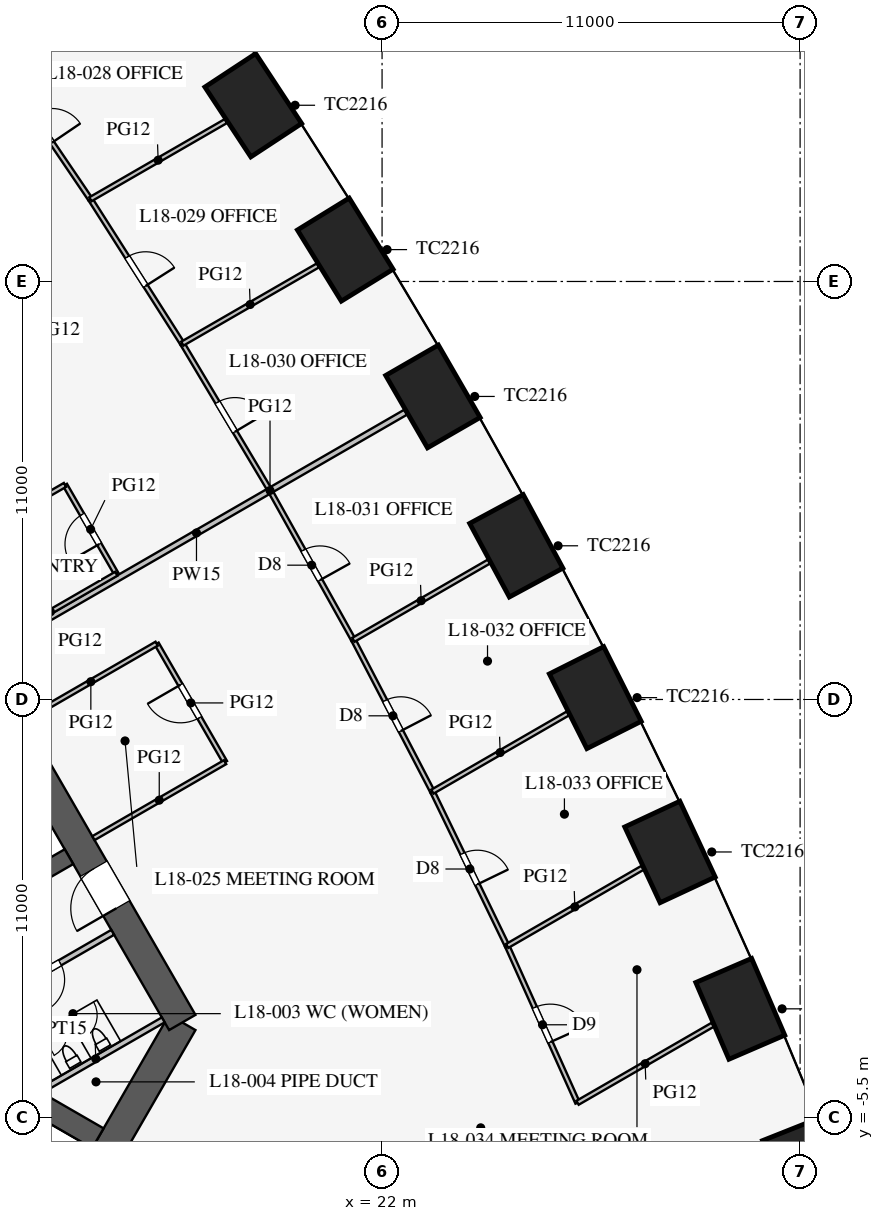
"""IFC4 building model, lengths in metres.
Left out: names, types, materials, properties, quantities, classifications, styles, units other than length and angle.
Written with IfcOpenShell. Run it as: python <this file> out.ifc"""

import sys

from ifc_helpers import new_model, si_unit, direction, frame, frame_2d, origin, origin_2d, place, context, subcontext, project, spatial, rectangle, extrude, element, fill, save


model = new_model("IFC4")
c1 = context("Model", 3, precision=1e-05, world=origin(), true_north=direction((0.0, 1.0)))
c2 = subcontext(c1, "Body", "Model", "MODEL_VIEW")
j1 = project(units=[si_unit("LENGTHUNIT", "METRE"), si_unit("PLANEANGLEUNIT", "RADIAN")], contexts=[c1])
p1 = place(None, origin())
s1 = spatial("IfcSite", under=j1, at=p1, CompositionType="ELEMENT")
p2 = place(p1, origin())
s2 = spatial("IfcBuilding", under=s1, at=p2, CompositionType="ELEMENT")
p3 = place(p2, frame((0.0, 0.0, 79.5)))
s3 = spatial("IfcBuildingStorey", under=s2, at=p3, CompositionType="ELEMENT", Elevation=79.5)
for number, where, z_axis, x_axis in (
    (1, (33.16, -6.836, 0.0), (0.0, 0.0, 1.0), (-0.369, 0.929, 0.0)),
    (2, (31.426, -2.641, 0.0), (0.0, 0.0, 1.0), (-0.396, 0.918, 0.0)),
    (3, (29.576, 1.487, 0.0), (0.0, 0.0, 1.0), (-0.423, 0.906, 0.0)),
    (4, (27.611, 5.549, 0.0), (0.0, 0.0, 1.0), (-0.449, 0.894, 0.0)),
    (5, (25.531, 9.544, 0.0), (0.0, 0.0, 1.0), (-0.475, 0.88, 0.0)),
    (6, (23.338, 13.474, 0.0), (0.0, 0.0, 1.0), (-0.5, 0.866, 0.0)),
    (7, (21.031, 17.339, 0.0), (0.0, 0.0, 1.0), (-0.525, 0.851, 0.0)),
    (8, (18.611, 21.137, 0.0), (0.0, 0.0, 1.0), (-0.549, 0.836, 0.0)),
):
    element("IfcColumn", number, at=place(p3, frame(where, z_axis=z_axis, x_axis=x_axis)), inside=s3, PredefinedType="COLUMN", context=c2, shape_type="SweptSolid", body=[
        extrude(rectangle(XDim=2.2, YDim=1.6, at=origin_2d()), origin(), (0.0, 0.0, 1.0), 4.2),
    ])
p4 = place(p3, frame((10.97, -13.0, 0.0), z_axis=(0.0, 0.0, 1.0), x_axis=(0.499995765644, 0.866027848477, 0.0)))
e9 = element("IfcWall", 9, at=p4, inside=s3, PredefinedType="SHEAR", context=c2, shape_type="SweptSolid", body=[
    extrude(rectangle(XDim=11.547, YDim=0.8, at=frame_2d((5.773, 0.0))), origin(), (0.0, 0.0, 1.0), 4.2),
])
p5 = place(p3, frame((16.743, -3.0, 0.0), z_axis=(0.0, 0.0, 1.0), x_axis=(-0.500002442456, 0.866023993627, 0.0)))
e10 = element("IfcWall", 10, at=p5, inside=s3, PredefinedType="SHEAR", context=c2, shape_type="SweptSolid", body=[
    extrude(rectangle(XDim=21.939, YDim=0.8, at=frame_2d((10.97, 0.0))), origin(), (0.0, 0.0, 1.0), 4.2),
])
p6 = place(p5, frame((17.27, 0.0, 0.0)))
e11 = element("IfcOpeningElement", 11, at=p6, cuts=e10, PredefinedType="OPENING", context=c2, shape_type="SweptSolid", body=[
    extrude(rectangle(XDim=1.2, YDim=2.1, at=frame_2d((0.6, 1.05))), frame((0.0, 0.41, 0.0), z_axis=(0.0, -1.0, 0.0), x_axis=(1.0, 0.0, 0.0)), (0.0, 0.0, 1.0), 0.82),
])
p7 = place(p5, frame((3.47, 0.0, 0.0)))
e12 = element("IfcOpeningElement", 12, at=p7, cuts=e10, PredefinedType="OPENING", context=c2, shape_type="SweptSolid", body=[
    extrude(rectangle(XDim=1.2, YDim=2.1, at=frame_2d((0.6, 1.05))), frame((0.0, 0.41, 0.0), z_axis=(0.0, -1.0, 0.0), x_axis=(1.0, 0.0, 0.0)), (0.0, 0.0, 1.0), 0.82),
])
p8 = place(p3, frame((11.532, 0.076, 0.0), z_axis=(0.0, 0.0, 1.0), x_axis=(0.866005588531, 0.500034319456, 0.0)))
e13 = element("IfcWall", 13, at=p8, inside=s3, PredefinedType="SHEAR", context=c2, shape_type="SweptSolid", body=[
    extrude(rectangle(XDim=2.575, YDim=0.45, at=frame_2d((1.288, 0.0))), origin(), (0.0, 0.0, 1.0), 4.2),
])
p9 = place(p3, frame((6.663, -1.509, 0.0), z_axis=(0.0, 0.0, 1.0), x_axis=(0.866019375473, -0.500010441196, 0.0)))
e14 = element("IfcWall", 14, at=p9, inside=s3, PredefinedType="SHEAR", context=c2, shape_type="SweptSolid", body=[
    extrude(rectangle(XDim=9.075, YDim=0.6, at=frame_2d((4.538, 0.0))), origin(), (0.0, 0.0, 1.0), 4.2),
])
p10 = place(p3, frame((10.495, -3.178, 0.0), z_axis=(0.0, 0.0, 1.0), x_axis=(0.86602216432, 0.500005610874, 0.0)))
e15 = element("IfcWall", 15, at=p10, inside=s3, PredefinedType="PARTITIONING", context=c2, shape_type="SweptSolid", body=[
    extrude(rectangle(XDim=5.1, YDim=0.15, at=frame_2d((2.55, 0.0))), origin(), (0.0, 0.0, 1.0), 4.0),
])
p11 = place(p10, frame((2.6, 0.0, 0.0)))
e16 = element("IfcOpeningElement", 16, at=p11, cuts=e15, PredefinedType="OPENING", context=c2, shape_type="SweptSolid", body=[
    extrude(rectangle(XDim=0.9, YDim=2.1, at=frame_2d((0.45, 1.05))), frame((0.0, 0.085, 0.0), z_axis=(0.0, -1.0, 0.0), x_axis=(1.0, 0.0, 0.0)), (0.0, 0.0, 1.0), 0.17),
])
p12 = place(p3, frame((12.691, -4.982, 0.0), z_axis=(0.0, 0.0, 1.0), x_axis=(0.8660249478, 0.500000789788, 0.0)))
e17 = element("IfcWall", 17, at=p12, inside=s3, PredefinedType="PARTITIONING", context=c2, shape_type="SweptSolid", body=[
    extrude(rectangle(XDim=4.1, YDim=0.15, at=frame_2d((2.05, 0.0))), origin(), (0.0, 0.0, 1.0), 4.0),
])
p13 = place(p3, frame((11.613, 6.705, 0.0), z_axis=(0.0, 0.0, 1.0), x_axis=(0.866029791586, 0.499992400027, 0.0)))
e18 = element("IfcWall", 18, at=p13, inside=s3, PredefinedType="PARTITIONING", context=c2, shape_type="SweptSolid", body=[
    extrude(rectangle(XDim=12.709, YDim=0.15, at=frame_2d((6.354, 0.0))), origin(), (0.0, 0.0, 1.0), 2.8),
])
p14 = place(p3, frame((15.006, 8.808, 0.0), z_axis=(0.0, 0.0, 1.0), x_axis=(-0.500048589285, 0.86599734893, 0.0)))
e19 = element("IfcWall", 19, at=p14, inside=s3, PredefinedType="PARTITIONING", context=c2, shape_type="SweptSolid", body=[
    extrude(rectangle(XDim=2.7, YDim=0.12, at=frame_2d((1.35, 0.0))), origin(), (0.0, 0.0, 1.0), 2.9),
])
p15 = place(p14, frame((0.9, 0.0, 0.15)))
e20 = element("IfcOpeningElement", 20, at=p15, cuts=e19, PredefinedType="OPENING", context=c2, shape_type="SweptSolid", body=[
    extrude(rectangle(XDim=0.9, YDim=2.1, at=frame_2d((0.45, 1.05))), frame((0.0, 0.07, 0.0), z_axis=(0.0, -1.0, 0.0), x_axis=(1.0, 0.0, 0.0)), (0.0, 0.0, 1.0), 0.14),
])
p16 = place(p3, frame((17.869, 3.85, 0.0), z_axis=(0.0, 0.0, 1.0), x_axis=(-0.500012057535, 0.866018442252, 0.0)))
e21 = element("IfcWall", 21, at=p16, inside=s3, PredefinedType="PARTITIONING", context=c2, shape_type="SweptSolid", body=[
    extrude(rectangle(XDim=3.6, YDim=0.12, at=frame_2d((1.8, 0.0))), origin(), (0.0, 0.0, 1.0), 2.9),
])
p17 = place(p16, frame((1.35, 0.0, 0.15)))
e22 = element("IfcOpeningElement", 22, at=p17, cuts=e21, PredefinedType="OPENING", context=c2, shape_type="SweptSolid", body=[
    extrude(rectangle(XDim=1.0, YDim=2.1, at=frame_2d((0.5, 1.05))), frame((0.0, 0.07, 0.0), z_axis=(0.0, -1.0, 0.0), x_axis=(1.0, 0.0, 0.0)), (0.0, 0.0, 1.0), 0.14),
])
p18 = place(p3, frame((11.542, 6.808, 0.0), z_axis=(0.0, 0.0, 1.0), x_axis=(0.866026010844, 0.49999894854, 0.0)))
e23 = element("IfcWall", 23, at=p18, inside=s3, PredefinedType="PARTITIONING", context=c2, shape_type="SweptSolid", body=[
    extrude(rectangle(XDim=4.0, YDim=0.12, at=frame_2d((2.0, 0.0))), origin(), (0.0, 0.0, 1.0), 2.8),
])
for number, where, z_axis, x_axis in (
    (24, (10.192, 9.146, 0.0), (0.0, 0.0, 1.0), (0.866, 0.5, 0.0)),
    (25, (12.605, 4.968, 0.0), (0.0, 0.0, 1.0), (0.866, 0.5, 0.0)),
    (26, (14.405, 1.85, 0.0), (0.0, 0.0, 1.0), (0.866, 0.5, 0.0)),
):
    element("IfcWall", number, at=place(p3, frame(where, z_axis=z_axis, x_axis=x_axis)), inside=s3, PredefinedType="PARTITIONING", context=c2, shape_type="SweptSolid", body=[
        extrude(rectangle(XDim=4.0, YDim=0.12, at=frame_2d((2.0, 0.0))), origin(), (0.0, 0.0, 1.0), 2.9),
    ])
p19 = place(p3, frame((19.052, 10.999, 0.0), z_axis=(0.0, 0.0, 1.0), x_axis=(-0.51252396108, 0.858672923364, 0.0)))
e27 = element("IfcWall", 27, at=p19, inside=s3, PredefinedType="PARTITIONING", context=c2, shape_type="SweptSolid", body=[
    extrude(rectangle(XDim=4.5, YDim=0.12, at=frame_2d((2.25, 0.0))), origin(), (0.0, 0.0, 1.0), 2.9),
])
p20 = place(p19, frame((1.8, 0.0, 0.15)))
e28 = element("IfcOpeningElement", 28, at=p20, cuts=e27, PredefinedType="OPENING", context=c2, shape_type="SweptSolid", body=[
    extrude(rectangle(XDim=0.9, YDim=2.1, at=frame_2d((0.45, 1.05))), frame((0.0, 0.07, 0.0), z_axis=(0.0, -1.0, 0.0), x_axis=(1.0, 0.0, 0.0)), (0.0, 0.0, 1.0), 0.14),
])
p21 = place(p3, frame((16.745, 14.864, 0.0), z_axis=(0.0, 0.0, 1.0), x_axis=(-0.537205132487, 0.843451626135, 0.0)))
e29 = element("IfcWall", 29, at=p21, inside=s3, PredefinedType="PARTITIONING", context=c2, shape_type="SweptSolid", body=[
    extrude(rectangle(XDim=4.504, YDim=0.12, at=frame_2d((2.252, 0.0))), origin(), (0.0, 0.0, 1.0), 2.9),
])
p22 = place(p21, frame((1.8, 0.0, 0.15)))
e30 = element("IfcOpeningElement", 30, at=p22, cuts=e29, PredefinedType="OPENING", context=c2, shape_type="SweptSolid", body=[
    extrude(rectangle(XDim=0.9, YDim=2.1, at=frame_2d((0.45, 1.05))), frame((0.0, 0.07, 0.0), z_axis=(0.0, -1.0, 0.0), x_axis=(1.0, 0.0, 0.0)), (0.0, 0.0, 1.0), 0.14),
])
p23 = place(p3, frame((14.325, 18.663, 0.0), z_axis=(0.0, 0.0, 1.0), x_axis=(-0.561512004239, 0.827468591002, 0.0)))
e31 = element("IfcWall", 31, at=p23, inside=s3, PredefinedType="PARTITIONING", context=c2, shape_type="SweptSolid", body=[
    extrude(rectangle(XDim=4.512, YDim=0.12, at=frame_2d((2.256, 0.0))), origin(), (0.0, 0.0, 1.0), 2.9),
])
p24 = place(p23, frame((1.8, 0.0, 0.15)))
e32 = element("IfcOpeningElement", 32, at=p24, cuts=e31, PredefinedType="OPENING", context=c2, shape_type="SweptSolid", body=[
    extrude(rectangle(XDim=0.9, YDim=2.1, at=frame_2d((0.45, 1.05))), frame((0.0, 0.07, 0.0), z_axis=(0.0, -1.0, 0.0), x_axis=(1.0, 0.0, 0.0)), (0.0, 0.0, 1.0), 0.14),
])
p25 = place(p3, frame((25.292, -0.986, 0.0), z_axis=(0.0, 0.0, 1.0), x_axis=(-0.435857917556, 0.900015486369, 0.0)))
e33 = element("IfcWall", 33, at=p25, inside=s3, PredefinedType="PARTITIONING", context=c2, shape_type="SweptSolid", body=[
    extrude(rectangle(XDim=4.512, YDim=0.12, at=frame_2d((2.256, 0.0))), origin(), (0.0, 0.0, 1.0), 2.9),
])
p26 = place(p25, frame((1.8, 0.0, 0.15)))
e34 = element("IfcOpeningElement", 34, at=p26, cuts=e33, PredefinedType="OPENING", context=c2, shape_type="SweptSolid", body=[
    extrude(rectangle(XDim=0.9, YDim=2.1, at=frame_2d((0.45, 1.05))), frame((0.0, 0.07, 0.0), z_axis=(0.0, -1.0, 0.0), x_axis=(1.0, 0.0, 0.0)), (0.0, 0.0, 1.0), 0.14),
])
p27 = place(p3, frame((27.144, -5.113, 0.0), z_axis=(0.0, 0.0, 1.0), x_axis=(-0.409451055745, 0.912332084796, 0.0)))
e35 = element("IfcWall", 35, at=p27, inside=s3, PredefinedType="PARTITIONING", context=c2, shape_type="SweptSolid", body=[
    extrude(rectangle(XDim=4.523, YDim=0.12, at=frame_2d((2.262, 0.0))), origin(), (0.0, 0.0, 1.0), 2.9),
])
p28 = place(p27, frame((1.75, 0.0, 0.15)))
e36 = element("IfcOpeningElement", 36, at=p28, cuts=e35, PredefinedType="OPENING", context=c2, shape_type="SweptSolid", body=[
    extrude(rectangle(XDim=1.0, YDim=2.1, at=frame_2d((0.5, 1.05))), frame((0.0, 0.07, 0.0), z_axis=(0.0, -1.0, 0.0), x_axis=(1.0, 0.0, 0.0)), (0.0, 0.0, 1.0), 0.14),
])
p29 = place(p3, frame((21.245, 7.07, 0.0), z_axis=(0.0, 0.0, 1.0), x_axis=(-0.487373854787, 0.873193406795, 0.0)))
e37 = element("IfcWall", 37, at=p29, inside=s3, PredefinedType="PARTITIONING", context=c2, shape_type="SweptSolid", body=[
    extrude(rectangle(XDim=4.5, YDim=0.12, at=frame_2d((2.25, 0.0))), origin(), (0.0, 0.0, 1.0), 2.9),
])
p30 = place(p29, frame((1.8, 0.0, 0.15)))
e38 = element("IfcOpeningElement", 38, at=p30, cuts=e37, PredefinedType="OPENING", context=c2, shape_type="SweptSolid", body=[
    extrude(rectangle(XDim=0.9, YDim=2.1, at=frame_2d((0.45, 1.05))), frame((0.0, 0.07, 0.0), z_axis=(0.0, -1.0, 0.0), x_axis=(1.0, 0.0, 0.0)), (0.0, 0.0, 1.0), 0.14),
])
p31 = place(p3, frame((23.325, 3.074, 0.0), z_axis=(0.0, 0.0, 1.0), x_axis=(-0.461852697957, 0.886956642339, 0.0)))
e39 = element("IfcWall", 39, at=p31, inside=s3, PredefinedType="PARTITIONING", context=c2, shape_type="SweptSolid", body=[
    extrude(rectangle(XDim=4.504, YDim=0.12, at=frame_2d((2.252, 0.0))), origin(), (0.0, 0.0, 1.0), 2.9),
])
p32 = place(p31, frame((1.8, 0.0, 0.15)))
e40 = element("IfcOpeningElement", 40, at=p32, cuts=e39, PredefinedType="OPENING", context=c2, shape_type="SweptSolid", body=[
    extrude(rectangle(XDim=0.9, YDim=2.1, at=frame_2d((0.45, 1.05))), frame((0.0, 0.07, 0.0), z_axis=(0.0, -1.0, 0.0), x_axis=(1.0, 0.0, 0.0)), (0.0, 0.0, 1.0), 0.14),
])
p33 = place(p3, frame((11.792, 22.396, 0.0), z_axis=(0.0, 0.0, 1.0), x_axis=(0.865991869213, 0.500058079084, 0.0)))
e41 = element("IfcWall", 41, at=p33, inside=s3, PredefinedType="PARTITIONING", context=c2, shape_type="SweptSolid", body=[
    extrude(rectangle(XDim=4.114, YDim=0.12, at=frame_2d((2.057, 0.0))), origin(), (0.0, 0.0, 1.0), 2.6),
])
p34 = place(p3, frame((16.745, 14.864, 0.0), z_axis=(0.0, 0.0, 1.0), x_axis=(0.8660059538, 0.500033686847, 0.0)))
e42 = element("IfcWall", 42, at=p34, inside=s3, PredefinedType="PARTITIONING", context=c2, shape_type="SweptSolid", body=[
    extrude(rectangle(XDim=4.119, YDim=0.12, at=frame_2d((2.06, 0.0))), origin(), (0.0, 0.0, 1.0), 2.8),
])
p35 = place(p3, frame((14.325, 18.663, 0.0), z_axis=(0.0, 0.0, 1.0), x_axis=(0.866030556495, 0.499991075137, 0.0)))
e43 = element("IfcWall", 43, at=p35, inside=s3, PredefinedType="PARTITIONING", context=c2, shape_type="SweptSolid", body=[
    extrude(rectangle(XDim=4.117, YDim=0.12, at=frame_2d((2.059, 0.0))), origin(), (0.0, 0.0, 1.0), 2.8),
])
p36 = place(p3, frame((25.292, -0.986, 0.0), z_axis=(0.0, 0.0, 1.0), x_axis=(0.86601756884, 0.500013570277, 0.0)))
e44 = element("IfcWall", 44, at=p36, inside=s3, PredefinedType="PARTITIONING", context=c2, shape_type="SweptSolid", body=[
    extrude(rectangle(XDim=4.114, YDim=0.12, at=frame_2d((2.057, 0.0))), origin(), (0.0, 0.0, 1.0), 2.6),
])
p37 = place(p3, frame((27.144, -5.113, 0.0), z_axis=(0.0, 0.0, 1.0), x_axis=(0.866022320763, 0.500005339912, 0.0)))
e45 = element("IfcWall", 45, at=p37, inside=s3, PredefinedType="PARTITIONING", context=c2, shape_type="SweptSolid", body=[
    extrude(rectangle(XDim=4.109, YDim=0.12, at=frame_2d((2.054, 0.0))), origin(), (0.0, 0.0, 1.0), 2.6),
])
p38 = place(p3, frame((21.245, 7.07, 0.0), z_axis=(0.0, 0.0, 1.0), x_axis=(0.866031617834, 0.499989236795, 0.0)))
e46 = element("IfcWall", 46, at=p38, inside=s3, PredefinedType="PARTITIONING", context=c2, shape_type="SweptSolid", body=[
    extrude(rectangle(XDim=4.119, YDim=0.12, at=frame_2d((2.06, 0.0))), origin(), (0.0, 0.0, 1.0), 2.8),
])
p39 = place(p3, frame((23.325, 3.074, 0.0), z_axis=(0.0, 0.0, 1.0), x_axis=(0.866030556495, 0.499991075137, 0.0)))
e47 = element("IfcWall", 47, at=p39, inside=s3, PredefinedType="PARTITIONING", context=c2, shape_type="SweptSolid", body=[
    extrude(rectangle(XDim=4.117, YDim=0.12, at=frame_2d((2.059, 0.0))), origin(), (0.0, 0.0, 1.0), 2.8),
])
p40 = place(p11, frame((0.9, 0.0, 0.0), z_axis=(0.0, 0.0, 1.0), x_axis=(-1.0, 0.0, 0.0)))
e48 = element("IfcDoor", 48, at=p40, inside=s3, OperationType="SINGLE_SWING_RIGHT", PredefinedType="DOOR", context=c2, shape_type="SweptSolid", body=[
    extrude(rectangle(XDim=0.9, YDim=2.1, at=frame_2d((0.45, 1.05))), frame((0.0, 0.025, 0.0), z_axis=(0.0, -1.0, 0.0), x_axis=(1.0, 0.0, 0.0)), (0.0, 0.0, 1.0), 0.05),
])
fill(e16, e48)
p41 = place(p7, origin())
e49 = element("IfcDoor", 49, at=p41, inside=s3, OperationType="SINGLE_SWING_LEFT", PredefinedType="DOOR", context=c2, shape_type="SweptSolid", body=[
    extrude(rectangle(XDim=1.2, YDim=2.1, at=frame_2d((0.6, 1.05))), frame((0.0, 0.025, 0.0), z_axis=(0.0, -1.0, 0.0), x_axis=(1.0, 0.0, 0.0)), (0.0, 0.0, 1.0), 0.05),
])
fill(e12, e49)
p42 = place(p17, origin())
e50 = element("IfcDoor", 50, at=p42, inside=s3, OperationType="SINGLE_SWING_RIGHT", PredefinedType="DOOR", context=c2, shape_type="SweptSolid", body=[
    extrude(rectangle(XDim=1.0, YDim=2.1, at=frame_2d((0.5, 1.05))), frame((0.0, 0.025, 0.0), z_axis=(0.0, -1.0, 0.0), x_axis=(1.0, 0.0, 0.0)), (0.0, 0.0, 1.0), 0.05),
])
fill(e22, e50)
p43 = place(p15, origin())
e51 = element("IfcDoor", 51, at=p43, inside=s3, OperationType="SINGLE_SWING_LEFT", PredefinedType="DOOR", context=c2, shape_type="SweptSolid", body=[
    extrude(rectangle(XDim=0.9, YDim=2.1, at=frame_2d((0.45, 1.05))), frame((0.0, 0.025, 0.0), z_axis=(0.0, -1.0, 0.0), x_axis=(1.0, 0.0, 0.0)), (0.0, 0.0, 1.0), 0.05),
])
fill(e20, e51)
p44 = place(p24, frame((0.9, 0.0, 0.0), z_axis=(0.0, 0.0, 1.0), x_axis=(-1.0, 0.0, 0.0)))
e52 = element("IfcDoor", 52, at=p44, inside=s3, OperationType="SINGLE_SWING_RIGHT", PredefinedType="DOOR", context=c2, shape_type="SweptSolid", body=[
    extrude(rectangle(XDim=0.9, YDim=2.1, at=frame_2d((0.45, 1.05))), frame((0.0, 0.025, 0.0), z_axis=(0.0, -1.0, 0.0), x_axis=(1.0, 0.0, 0.0)), (0.0, 0.0, 1.0), 0.05),
])
fill(e32, e52)
p45 = place(p22, frame((0.9, 0.0, 0.0), z_axis=(0.0, 0.0, 1.0), x_axis=(-1.0, 0.0, 0.0)))
e53 = element("IfcDoor", 53, at=p45, inside=s3, OperationType="SINGLE_SWING_RIGHT", PredefinedType="DOOR", context=c2, shape_type="SweptSolid", body=[
    extrude(rectangle(XDim=0.9, YDim=2.1, at=frame_2d((0.45, 1.05))), frame((0.0, 0.025, 0.0), z_axis=(0.0, -1.0, 0.0), x_axis=(1.0, 0.0, 0.0)), (0.0, 0.0, 1.0), 0.05),
])
fill(e30, e53)
p46 = place(p20, frame((0.9, 0.0, 0.0), z_axis=(0.0, 0.0, 1.0), x_axis=(-1.0, 0.0, 0.0)))
e54 = element("IfcDoor", 54, at=p46, inside=s3, OperationType="SINGLE_SWING_RIGHT", PredefinedType="DOOR", context=c2, shape_type="SweptSolid", body=[
    extrude(rectangle(XDim=0.9, YDim=2.1, at=frame_2d((0.45, 1.05))), frame((0.0, 0.025, 0.0), z_axis=(0.0, -1.0, 0.0), x_axis=(1.0, 0.0, 0.0)), (0.0, 0.0, 1.0), 0.05),
])
fill(e28, e54)
p47 = place(p30, frame((0.9, 0.0, 0.0), z_axis=(0.0, 0.0, 1.0), x_axis=(-1.0, 0.0, 0.0)))
e55 = element("IfcDoor", 55, at=p47, inside=s3, OperationType="SINGLE_SWING_RIGHT", PredefinedType="DOOR", context=c2, shape_type="SweptSolid", body=[
    extrude(rectangle(XDim=0.9, YDim=2.1, at=frame_2d((0.45, 1.05))), frame((0.0, 0.025, 0.0), z_axis=(0.0, -1.0, 0.0), x_axis=(1.0, 0.0, 0.0)), (0.0, 0.0, 1.0), 0.05),
])
fill(e38, e55)
p48 = place(p32, frame((0.9, 0.0, 0.0), z_axis=(0.0, 0.0, 1.0), x_axis=(-1.0, 0.0, 0.0)))
e56 = element("IfcDoor", 56, at=p48, inside=s3, OperationType="SINGLE_SWING_RIGHT", PredefinedType="DOOR", context=c2, shape_type="SweptSolid", body=[
    extrude(rectangle(XDim=0.9, YDim=2.1, at=frame_2d((0.45, 1.05))), frame((0.0, 0.025, 0.0), z_axis=(0.0, -1.0, 0.0), x_axis=(1.0, 0.0, 0.0)), (0.0, 0.0, 1.0), 0.05),
])
fill(e40, e56)
p49 = place(p26, frame((0.9, 0.0, 0.0), z_axis=(0.0, 0.0, 1.0), x_axis=(-1.0, 0.0, 0.0)))
e57 = element("IfcDoor", 57, at=p49, inside=s3, OperationType="SINGLE_SWING_RIGHT", PredefinedType="DOOR", context=c2, shape_type="SweptSolid", body=[
    extrude(rectangle(XDim=0.9, YDim=2.1, at=frame_2d((0.45, 1.05))), frame((0.0, 0.025, 0.0), z_axis=(0.0, -1.0, 0.0), x_axis=(1.0, 0.0, 0.0)), (0.0, 0.0, 1.0), 0.05),
])
fill(e34, e57)
p50 = place(p28, frame((1.0, 0.0, 0.0), z_axis=(0.0, 0.0, 1.0), x_axis=(-1.0, 0.0, 0.0)))
e58 = element("IfcDoor", 58, at=p50, inside=s3, OperationType="SINGLE_SWING_RIGHT", PredefinedType="DOOR", context=c2, shape_type="SweptSolid", body=[
    extrude(rectangle(XDim=1.0, YDim=2.1, at=frame_2d((0.5, 1.05))), frame((0.0, 0.025, 0.0), z_axis=(0.0, -1.0, 0.0), x_axis=(1.0, 0.0, 0.0)), (0.0, 0.0, 1.0), 0.05),
])
fill(e36, e58)
save(model, sys.argv[1])
